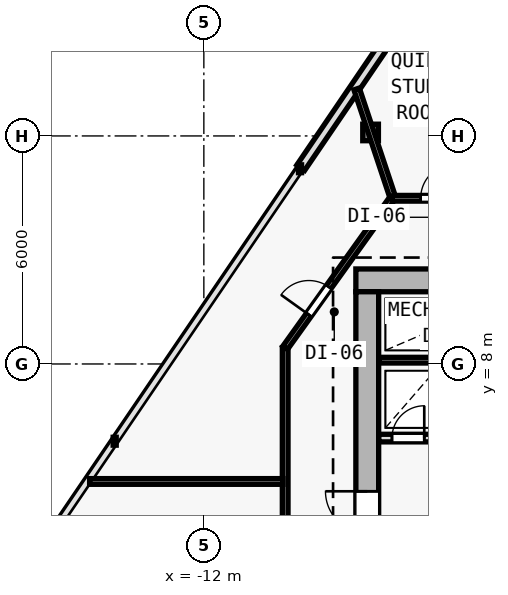
"""IFC4 building model, lengths in metres.
Left out: names, types, materials, properties, quantities, classifications, styles, units other than length and angle.
Written with IfcOpenShell. Run it as: python <this file> out.ifc"""

import sys

from ifc_helpers import new_model, si_unit, direction, frame, frame_2d, origin, origin_2d, place, context, subcontext, project, spatial, rectangle, i_section, extrude, element, fill, save


model = new_model("IFC4")
c1 = context("Model", 3, precision=1e-05, world=origin(), true_north=direction((0.0, 1.0)))
c2 = subcontext(c1, "Body", "Model", "MODEL_VIEW")
j1 = project(units=[si_unit("LENGTHUNIT", "METRE"), si_unit("PLANEANGLEUNIT", "RADIAN")], contexts=[c1])
p1 = place(None, origin())
s1 = spatial("IfcSite", under=j1, at=p1, CompositionType="ELEMENT")
p2 = place(p1, origin())
s2 = spatial("IfcBuilding", under=s1, at=p2, CompositionType="ELEMENT")
p3 = place(p2, frame((0.0, 0.0, 69.6)))
s3 = spatial("IfcBuildingStorey", under=s2, at=p3, CompositionType="ELEMENT", Elevation=69.6)
p4 = place(p3, frame((-7.7, 10.2, 0.0), z_axis=(0.0, 0.0, 1.0), x_axis=(1.0, 0.0, 0.0)))
e1 = element("IfcColumn", 1, at=p4, inside=s3, PredefinedType="COLUMN", context=c2, shape_type="SweptSolid", body=[
    extrude(i_section(OverallWidth=0.416, OverallDepth=0.446, WebThickness=0.025, FlangeThickness=0.04, FilletRadius=0.015, at=origin_2d()), origin(), (0.0, 0.0, 1.0), 3.6),
])
p5 = place(p3, frame((-7.612, 14.092, 0.005), z_axis=(0.008774547672, -0.002516730728, 0.999958335822), x_axis=(0.275705143097, 0.961242255662, 0.0)))
e2 = element("IfcColumn", 2, at=p5, inside=s3, PredefinedType="COLUMN", context=c2, shape_type="SweptSolid", body=[
    extrude(i_section(OverallWidth=0.412, OverallDepth=0.435, WebThickness=0.023, FlangeThickness=0.037, FilletRadius=0.015, at=origin_2d()), origin(), (0.0, 0.0, 1.0), 3.589),
])
p6 = place(p3, frame((-9.451, 13.163, 0.0), z_axis=(0.0, 0.0, 1.0), x_axis=(0.562478152622, 0.826812147844, 0.0)))
e3 = element("IfcWall", 3, at=p6, inside=s3, PredefinedType="SOLIDWALL", context=c2, shape_type="SweptSolid", body=[
    extrude(rectangle(XDim=12.232, YDim=0.25, at=frame_2d((6.116, 0.0))), origin(), (0.0, 0.0, 1.0), 3.28),
])
p7 = place(p6, frame((5.566, 0.0, 0.62)))
e4 = element("IfcOpeningElement", 4, at=p7, cuts=e3, PredefinedType="OPENING", context=c2, shape_type="SweptSolid", body=[
    extrude(rectangle(XDim=1.1, YDim=1.8, at=frame_2d((0.55, 0.9))), frame((0.0, 0.135, 0.0), z_axis=(0.0, -1.0, 0.0), x_axis=(1.0, 0.0, 0.0)), (0.0, 0.0, 1.0), 0.27),
])
p8 = place(p3, frame((8.0, 10.2, 0.0), z_axis=(0.0, 0.0, 1.0), x_axis=(-1.0, 0.0, 0.0)))
e5 = element("IfcWall", 5, at=p8, inside=s3, PredefinedType="SHEAR", context=c2, shape_type="SweptSolid", body=[
    extrude(rectangle(XDim=16.0, YDim=0.6, at=frame_2d((8.0, 0.0))), origin(), (0.0, 0.0, 1.0), 3.28),
])
p9 = place(p8, frame((4.45, 0.0, 0.0)))
e6 = element("IfcOpeningElement", 6, at=p9, cuts=e5, PredefinedType="OPENING", context=c2, shape_type="SweptSolid", body=[
    extrude(rectangle(XDim=1.1, YDim=2.15, at=frame_2d((0.55, 1.075))), frame((0.0, 0.31, 0.0), z_axis=(0.0, -1.0, 0.0), x_axis=(1.0, 0.0, 0.0)), (0.0, 0.0, 1.0), 0.62),
])
p10 = place(p3, frame((-7.7, -9.1, 0.0), z_axis=(0.0, 0.0, 1.0), x_axis=(0.0, 1.0, 0.0)))
e7 = element("IfcWall", 7, at=p10, inside=s3, PredefinedType="SHEAR", context=c2, shape_type="SweptSolid", body=[
    extrude(rectangle(XDim=19.0, YDim=0.6, at=frame_2d((9.5, 0.0))), origin(), (0.0, 0.0, 1.0), 3.28),
])
p11 = place(p10, frame((12.65, 0.0, 0.0)))
e8 = element("IfcOpeningElement", 8, at=p11, cuts=e7, PredefinedType="OPENING", context=c2, shape_type="SweptSolid", body=[
    extrude(rectangle(XDim=1.1, YDim=2.15, at=frame_2d((0.55, 1.075))), frame((0.0, 0.31, 0.0), z_axis=(0.0, -1.0, 0.0), x_axis=(1.0, 0.0, 0.0)), (0.0, 0.0, 1.0), 0.62),
])
p12 = place(p3, frame((-7.395, 6.05, 0.0), z_axis=(0.0, 0.0, 1.0), x_axis=(1.0, 0.0, 0.0)))
e9 = element("IfcWall", 9, at=p12, inside=s3, PredefinedType="SOLIDWALL", context=c2, shape_type="SweptSolid", body=[
    extrude(rectangle(XDim=3.545, YDim=0.2, at=frame_2d((1.772, 0.0))), origin(), (0.0, 0.0, 1.0), 3.28),
])
p13 = place(p12, frame((0.345, 0.0, 0.0)))
e10 = element("IfcOpeningElement", 10, at=p13, cuts=e9, PredefinedType="OPENING", context=c2, shape_type="SweptSolid", body=[
    extrude(rectangle(XDim=0.85, YDim=2.1, at=frame_2d((0.425, 1.05))), frame((0.0, 0.11, 0.0), z_axis=(0.0, -1.0, 0.0), x_axis=(1.0, 0.0, 0.0)), (0.0, 0.0, 1.0), 0.22),
])
p14 = place(p12, frame((2.145, 0.0, 0.0)))
e11 = element("IfcOpeningElement", 11, at=p14, cuts=e9, PredefinedType="OPENING", context=c2, shape_type="SweptSolid", body=[
    extrude(rectangle(XDim=0.85, YDim=2.1, at=frame_2d((0.425, 1.05))), frame((0.0, 0.11, 0.0), z_axis=(0.0, -1.0, 0.0), x_axis=(1.0, 0.0, 0.0)), (0.0, 0.0, 1.0), 0.22),
])
p15 = place(p3, frame((-7.395, 8.1, 0.0), z_axis=(0.0, 0.0, 1.0), x_axis=(1.0, 0.0, 0.0)))
e12 = element("IfcWall", 12, at=p15, inside=s3, PredefinedType="PARTITIONING", context=c2, shape_type="SweptSolid", body=[
    extrude(rectangle(XDim=3.545, YDim=0.15, at=frame_2d((1.772, 0.0))), origin(), (0.0, 0.0, 1.0), 3.28),
])
p16 = place(p3, frame((-9.86, -11.56, 0.0), z_axis=(0.0, 0.0, 1.0), x_axis=(0.0, 1.0, 0.0)))
e13 = element("IfcWall", 13, at=p16, inside=s3, PredefinedType="PARTITIONING", context=c2, shape_type="SweptSolid", body=[
    extrude(rectangle(XDim=19.986, YDim=0.15, at=frame_2d((9.993, 0.0))), origin(), (0.0, 0.0, 1.0), 2.539),
])
p17 = place(p16, frame((9.359, 0.0, 0.0)))
e14 = element("IfcOpeningElement", 14, at=p17, cuts=e13, PredefinedType="OPENING", context=c2, shape_type="SweptSolid", body=[
    extrude(rectangle(XDim=0.9, YDim=2.1, at=frame_2d((0.45, 1.05))), frame((0.0, 0.085, 0.0), z_axis=(0.0, -1.0, 0.0), x_axis=(1.0, 0.0, 0.0)), (0.0, 0.0, 1.0), 0.17),
])
p18 = place(p16, frame((4.749, 0.0, 0.0)))
e15 = element("IfcOpeningElement", 15, at=p18, cuts=e13, PredefinedType="OPENING", context=c2, shape_type="SweptSolid", body=[
    extrude(rectangle(XDim=0.9, YDim=2.1, at=frame_2d((0.45, 1.05))), frame((0.0, 0.085, 0.0), z_axis=(0.0, -1.0, 0.0), x_axis=(1.0, 0.0, 0.0)), (0.0, 0.0, 1.0), 0.17),
])
p19 = place(p16, frame((0.958, 0.0, 0.0)))
e16 = element("IfcOpeningElement", 16, at=p19, cuts=e13, PredefinedType="OPENING", context=c2, shape_type="SweptSolid", body=[
    extrude(rectangle(XDim=0.9, YDim=2.1, at=frame_2d((0.45, 1.05))), frame((0.0, 0.085, 0.0), z_axis=(0.0, -1.0, 0.0), x_axis=(1.0, 0.0, 0.0)), (0.0, 0.0, 1.0), 0.17),
])
p20 = place(p16, frame((13.713, 0.0, 0.0)))
e17 = element("IfcOpeningElement", 17, at=p20, cuts=e13, PredefinedType="OPENING", context=c2, shape_type="SweptSolid", body=[
    extrude(rectangle(XDim=0.9, YDim=2.1, at=frame_2d((0.45, 1.05))), frame((0.0, 0.085, 0.0), z_axis=(0.0, -1.0, 0.0), x_axis=(1.0, 0.0, 0.0)), (0.0, 0.0, 1.0), 0.17),
])
p21 = place(p3, frame((-9.86, 8.426, 0.0), z_axis=(0.0, 0.0, 1.0), x_axis=(0.582449511476, 0.812866881218, 0.0)))
e18 = element("IfcWall", 18, at=p21, inside=s3, PredefinedType="PARTITIONING", context=c2, shape_type="SweptSolid", body=[
    extrude(rectangle(XDim=4.84, YDim=0.15, at=frame_2d((2.42, 0.0))), origin(), (0.0, 0.0, 1.0), 2.655),
])
p22 = place(p21, frame((1.07, 0.0, 0.0)))
e19 = element("IfcOpeningElement", 19, at=p22, cuts=e18, PredefinedType="OPENING", context=c2, shape_type="SweptSolid", body=[
    extrude(rectangle(XDim=0.9, YDim=2.1, at=frame_2d((0.45, 1.05))), frame((0.0, 0.085, 0.0), z_axis=(0.0, -1.0, 0.0), x_axis=(1.0, 0.0, 0.0)), (0.0, 0.0, 1.0), 0.17),
])
p23 = place(p3, frame((-7.041, 12.36, 0.0), z_axis=(0.0, 0.0, 1.0), x_axis=(1.0, 0.0, 0.0)))
e20 = element("IfcWall", 20, at=p23, inside=s3, PredefinedType="PARTITIONING", context=c2, shape_type="SweptSolid", body=[
    extrude(rectangle(XDim=14.082, YDim=0.15, at=frame_2d((7.041, 0.0))), origin(), (0.0, 0.0, 1.0), 3.28),
])
p24 = place(p23, frame((12.783, 0.0, 0.0)))
e21 = element("IfcOpeningElement", 21, at=p24, cuts=e20, PredefinedType="OPENING", context=c2, shape_type="SweptSolid", body=[
    extrude(rectangle(XDim=0.85, YDim=2.1, at=frame_2d((0.425, 1.05))), frame((0.0, 0.085, 0.0), z_axis=(0.0, -1.0, 0.0), x_axis=(1.0, 0.0, 0.0)), (0.0, 0.0, 1.0), 0.17),
])
p25 = place(p23, frame((10.857, 0.0, 0.0)))
e22 = element("IfcOpeningElement", 22, at=p25, cuts=e20, PredefinedType="OPENING", context=c2, shape_type="SweptSolid", body=[
    extrude(rectangle(XDim=0.9, YDim=2.1, at=frame_2d((0.45, 1.05))), frame((0.0, 0.085, 0.0), z_axis=(0.0, -1.0, 0.0), x_axis=(1.0, 0.0, 0.0)), (0.0, 0.0, 1.0), 0.17),
])
p26 = place(p23, frame((8.904, 0.0, 0.0)))
e23 = element("IfcOpeningElement", 23, at=p26, cuts=e20, PredefinedType="OPENING", context=c2, shape_type="SweptSolid", body=[
    extrude(rectangle(XDim=0.85, YDim=2.1, at=frame_2d((0.425, 1.05))), frame((0.0, 0.085, 0.0), z_axis=(0.0, -1.0, 0.0), x_axis=(1.0, 0.0, 0.0)), (0.0, 0.0, 1.0), 0.17),
])
p27 = place(p23, frame((6.215, 0.0, 0.0)))
e24 = element("IfcOpeningElement", 24, at=p27, cuts=e20, PredefinedType="OPENING", context=c2, shape_type="SweptSolid", body=[
    extrude(rectangle(XDim=0.9, YDim=2.1, at=frame_2d((0.45, 1.05))), frame((0.0, 0.085, 0.0), z_axis=(0.0, -1.0, 0.0), x_axis=(1.0, 0.0, 0.0)), (0.0, 0.0, 1.0), 0.17),
])
p28 = place(p23, frame((3.768, 0.0, 0.0)))
e25 = element("IfcOpeningElement", 25, at=p28, cuts=e20, PredefinedType="OPENING", context=c2, shape_type="SweptSolid", body=[
    extrude(rectangle(XDim=0.85, YDim=2.1, at=frame_2d((0.425, 1.05))), frame((0.0, 0.085, 0.0), z_axis=(0.0, -1.0, 0.0), x_axis=(1.0, 0.0, 0.0)), (0.0, 0.0, 1.0), 0.17),
])
p29 = place(p23, frame((2.439, 0.0, 0.0)))
e26 = element("IfcOpeningElement", 26, at=p29, cuts=e20, PredefinedType="OPENING", context=c2, shape_type="SweptSolid", body=[
    extrude(rectangle(XDim=0.85, YDim=2.1, at=frame_2d((0.425, 1.05))), frame((0.0, 0.085, 0.0), z_axis=(0.0, -1.0, 0.0), x_axis=(1.0, 0.0, 0.0)), (0.0, 0.0, 1.0), 0.17),
])
p30 = place(p23, frame((0.747, 0.0, 0.0)))
e27 = element("IfcOpeningElement", 27, at=p30, cuts=e20, PredefinedType="OPENING", context=c2, shape_type="SweptSolid", body=[
    extrude(rectangle(XDim=0.9, YDim=2.1, at=frame_2d((0.45, 1.05))), frame((0.0, 0.085, 0.0), z_axis=(0.0, -1.0, 0.0), x_axis=(1.0, 0.0, 0.0)), (0.0, 0.0, 1.0), 0.17),
])
p31 = place(p3, frame((-7.039, 12.414, 0.0), z_axis=(0.0, 0.0, 1.0), x_axis=(-0.316006200203, 0.948757124576, 0.0)))
e28 = element("IfcWall", 28, at=p31, inside=s3, PredefinedType="PARTITIONING", context=c2, shape_type="SweptSolid", body=[
    extrude(rectangle(XDim=2.975, YDim=0.15, at=frame_2d((1.488, 0.0))), origin(), (0.0, 0.0, 1.0), 2.655),
])
p32 = place(p3, frame((-9.92, 4.909, 0.0), z_axis=(0.0, 0.0, 1.0), x_axis=(-1.0, 0.0, 0.0)))
e29 = element("IfcWall", 29, at=p32, inside=s3, PredefinedType="PARTITIONING", context=c2, shape_type="SweptSolid", body=[
    extrude(rectangle(XDim=5.086, YDim=0.15, at=frame_2d((2.543, 0.0))), origin(), (0.0, 0.0, 1.0), 2.655),
])
p33 = place(p11, origin())
e30 = element("IfcDoor", 30, at=p33, inside=s3, OperationType="SINGLE_SWING_RIGHT", PredefinedType="DOOR", context=c2, shape_type="SweptSolid", body=[
    extrude(rectangle(XDim=1.1, YDim=2.15, at=frame_2d((0.55, 1.075))), frame((0.0, 0.025, 0.0), z_axis=(0.0, -1.0, 0.0), x_axis=(1.0, 0.0, 0.0)), (0.0, 0.0, 1.0), 0.05),
])
fill(e8, e30)
p34 = place(p13, origin())
e31 = element("IfcDoor", 31, at=p34, inside=s3, OperationType="SINGLE_SWING_RIGHT", PredefinedType="DOOR", context=c2, shape_type="SweptSolid", body=[
    extrude(rectangle(XDim=0.85, YDim=2.1, at=frame_2d((0.425, 1.05))), frame((0.0, 0.025, 0.0), z_axis=(0.0, -1.0, 0.0), x_axis=(1.0, 0.0, 0.0)), (0.0, 0.0, 1.0), 0.05),
])
fill(e10, e31)
p35 = place(p30, origin())
e32 = element("IfcDoor", 32, at=p35, inside=s3, OperationType="SINGLE_SWING_RIGHT", PredefinedType="DOOR", context=c2, shape_type="SweptSolid", body=[
    extrude(rectangle(XDim=0.9, YDim=2.1, at=frame_2d((0.45, 1.05))), frame((0.0, 0.025, 0.0), z_axis=(0.0, -1.0, 0.0), x_axis=(1.0, 0.0, 0.0)), (0.0, 0.0, 1.0), 0.05),
])
fill(e27, e32)
p36 = place(p22, origin())
e33 = element("IfcDoor", 33, at=p36, inside=s3, OperationType="SINGLE_SWING_LEFT", PredefinedType="DOOR", context=c2, shape_type="SweptSolid", body=[
    extrude(rectangle(XDim=0.9, YDim=2.1, at=frame_2d((0.45, 1.05))), frame((0.0, 0.025, 0.0), z_axis=(0.0, -1.0, 0.0), x_axis=(1.0, 0.0, 0.0)), (0.0, 0.0, 1.0), 0.05),
])
fill(e19, e33)
save(model, sys.argv[1])
